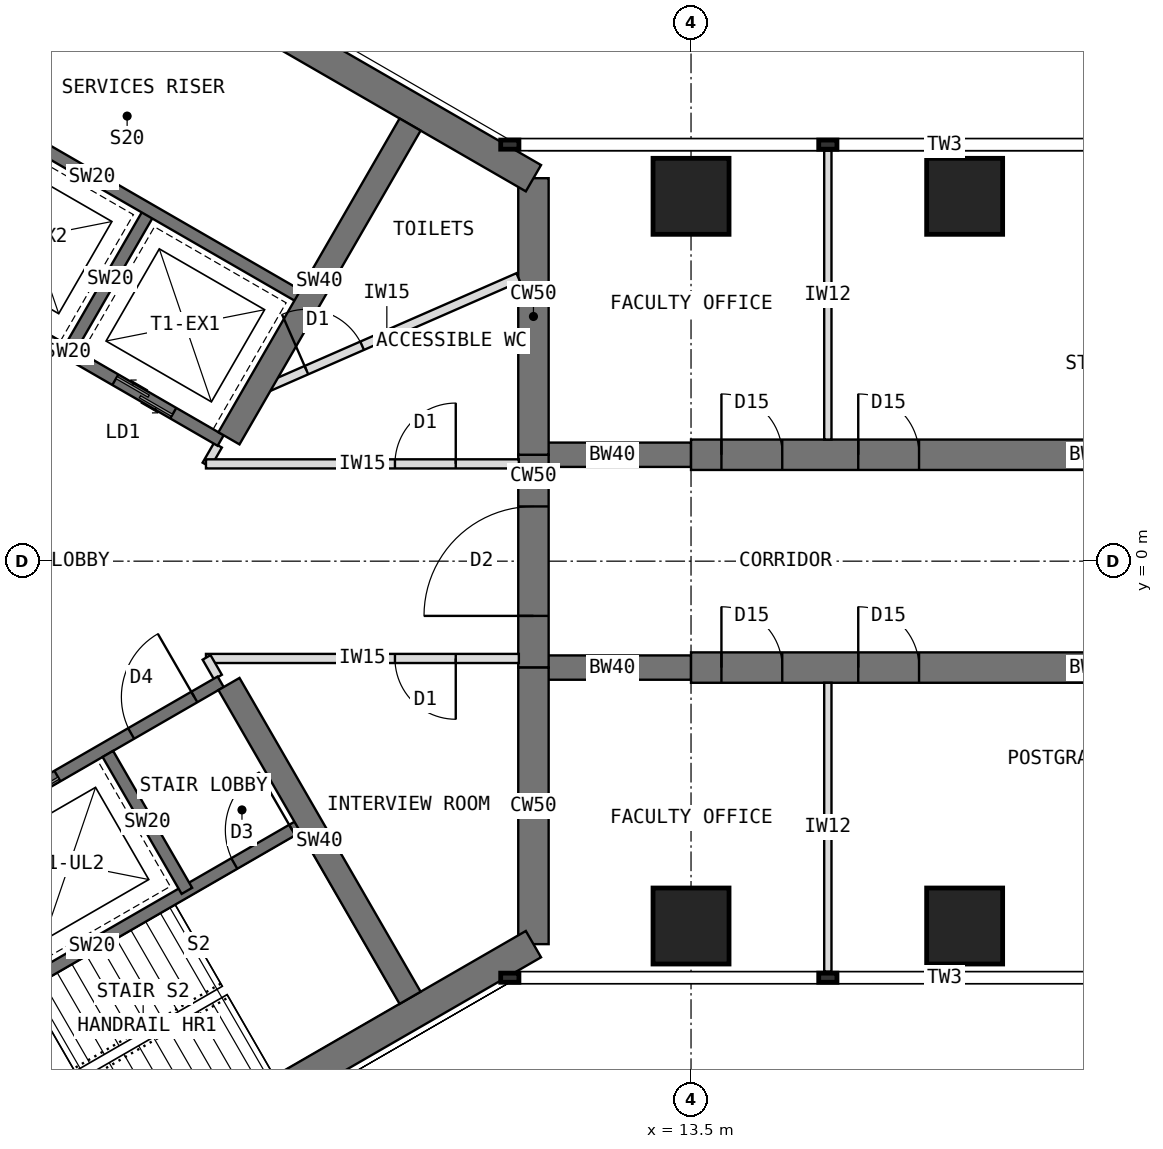
"""IFC4 building model, lengths in metres.
Left out: names, types, materials, properties, quantities, classifications, styles, units other than length and angle.
Written with IfcOpenShell. Run it as: python <this file> out.ifc"""

import sys

from ifc_helpers import new_model, si_unit, direction, frame, frame_2d, origin, origin_2d, place, context, subcontext, project, spatial, rectangle, extrude, element, fill, save


model = new_model("IFC4")
c1 = context("Model", 3, precision=1e-05, world=origin(), true_north=direction((0.0, 1.0)))
c2 = subcontext(c1, "Body", "Model", "MODEL_VIEW")
j1 = project(units=[si_unit("LENGTHUNIT", "METRE"), si_unit("PLANEANGLEUNIT", "RADIAN")], contexts=[c1])
p1 = place(None, origin())
s1 = spatial("IfcSite", under=j1, at=p1, CompositionType="ELEMENT")
p2 = place(p1, origin())
s2 = spatial("IfcBuilding", under=s1, at=p2, CompositionType="ELEMENT")
p3 = place(p2, frame((0.0, 0.0, 170.5)))
s3 = spatial("IfcBuildingStorey", under=s2, at=p3, CompositionType="ELEMENT", Elevation=170.5)
p4 = place(p3, frame((10.908, -6.298, 0.0), z_axis=(0.0, 0.0, 1.0), x_axis=(0.0, 1.0, 0.0)))
e1 = element("IfcWall", 1, at=p4, inside=s3, PredefinedType="SHEAR", context=c2, shape_type="SweptSolid", body=[
    extrude(rectangle(XDim=4.548, YDim=0.5, at=frame_2d((2.274, 0.0))), origin(), (0.0, 0.0, 1.0), 4.0),
])
p5 = place(p3, frame((10.908, -1.75, 0.0), z_axis=(0.0, 0.0, 1.0), x_axis=(0.0, 1.0, 0.0)))
e2 = element("IfcWall", 2, at=p5, inside=s3, PredefinedType="SHEAR", context=c2, shape_type="SweptSolid", body=[
    extrude(rectangle(XDim=3.5, YDim=0.5, at=frame_2d((1.75, 0.0))), origin(), (0.0, 0.0, 1.0), 4.0),
])
p6 = place(p5, frame((0.85, 0.0, 0.0)))
e3 = element("IfcOpeningElement", 3, at=p6, cuts=e2, PredefinedType="OPENING", context=c2, shape_type="SweptSolid", body=[
    extrude(rectangle(XDim=1.8, YDim=2.1, at=frame_2d((0.9, 1.05))), frame((0.0, 0.26, 0.0), z_axis=(0.0, -1.0, 0.0), x_axis=(1.0, 0.0, 0.0)), (0.0, 0.0, 1.0), 0.52),
])
p7 = place(p3, frame((10.908, 1.75, 0.0), z_axis=(0.0, 0.0, 1.0), x_axis=(0.0, 1.0, 0.0)))
e4 = element("IfcWall", 4, at=p7, inside=s3, PredefinedType="SHEAR", context=c2, shape_type="SweptSolid", body=[
    extrude(rectangle(XDim=4.548, YDim=0.5, at=frame_2d((2.274, 0.0))), origin(), (0.0, 0.0, 1.0), 4.0),
])
for number, where, z_axis, x_axis in (
    (5, (10.908, 6.298, 0.0), (0.0, 0.0, 1.0), (-0.866, 0.5, 0.0)),
    (6, (0.0, -12.596, 0.0), (0.0, 0.0, 1.0), (0.866, 0.5, 0.0)),
):
    element("IfcWall", number, at=place(p3, frame(where, z_axis=z_axis, x_axis=x_axis)), inside=s3, PredefinedType="SHEAR", context=c2, shape_type="SweptSolid", body=[
        extrude(rectangle(XDim=12.596, YDim=0.5, at=frame_2d((6.298, 0.0))), origin(), (0.0, 0.0, 1.0), 4.0),
    ])
p8 = place(p3, frame((10.908, 1.75, 0.0), z_axis=(0.0, 0.0, 1.0), x_axis=(1.0, 0.0, 0.0)))
e7 = element("IfcWall", 7, at=p8, inside=s3, PredefinedType="SHEAR", context=c2, shape_type="SweptSolid", body=[
    extrude(rectangle(XDim=2.592, YDim=0.4, at=frame_2d((1.296, 0.0))), origin(), (0.0, 0.0, 1.0), 4.0),
])
p9 = place(p3, frame((13.5, 1.75, 0.0), z_axis=(0.0, 0.0, 1.0), x_axis=(1.0, 0.0, 0.0)))
e8 = element("IfcWall", 8, at=p9, inside=s3, PredefinedType="SHEAR", context=c2, shape_type="SweptSolid", body=[
    extrude(rectangle(XDim=13.2, YDim=0.5, at=frame_2d((6.6, 0.0))), origin(), (0.0, 0.0, 1.0), 4.0),
])
p10 = place(p9, frame((0.5, 0.0, 0.0)))
e9 = element("IfcOpeningElement", 9, at=p10, cuts=e8, PredefinedType="OPENING", context=c2, shape_type="SweptSolid", body=[
    extrude(rectangle(XDim=1.0, YDim=2.1, at=frame_2d((0.5, 1.05))), frame((0.0, 0.26, 0.0), z_axis=(0.0, -1.0, 0.0), x_axis=(1.0, 0.0, 0.0)), (0.0, 0.0, 1.0), 0.52),
])
p11 = place(p9, frame((2.75, 0.0, 0.0)))
e10 = element("IfcOpeningElement", 10, at=p11, cuts=e8, PredefinedType="OPENING", context=c2, shape_type="SweptSolid", body=[
    extrude(rectangle(XDim=1.0, YDim=2.1, at=frame_2d((0.5, 1.05))), frame((0.0, 0.26, 0.0), z_axis=(0.0, -1.0, 0.0), x_axis=(1.0, 0.0, 0.0)), (0.0, 0.0, 1.0), 0.52),
])
p12 = place(p3, frame((10.908, -1.75, 0.0), z_axis=(0.0, 0.0, 1.0), x_axis=(1.0, 0.0, 0.0)))
e11 = element("IfcWall", 11, at=p12, inside=s3, PredefinedType="SHEAR", context=c2, shape_type="SweptSolid", body=[
    extrude(rectangle(XDim=2.592, YDim=0.4, at=frame_2d((1.296, 0.0))), origin(), (0.0, 0.0, 1.0), 4.0),
])
p13 = place(p3, frame((13.5, -1.75, 0.0), z_axis=(0.0, 0.0, 1.0), x_axis=(1.0, 0.0, 0.0)))
e12 = element("IfcWall", 12, at=p13, inside=s3, PredefinedType="SHEAR", context=c2, shape_type="SweptSolid", body=[
    extrude(rectangle(XDim=13.2, YDim=0.5, at=frame_2d((6.6, 0.0))), origin(), (0.0, 0.0, 1.0), 4.0),
])
p14 = place(p13, frame((0.5, 0.0, 0.0)))
e13 = element("IfcOpeningElement", 13, at=p14, cuts=e12, PredefinedType="OPENING", context=c2, shape_type="SweptSolid", body=[
    extrude(rectangle(XDim=1.0, YDim=2.1, at=frame_2d((0.5, 1.05))), frame((0.0, 0.26, 0.0), z_axis=(0.0, -1.0, 0.0), x_axis=(1.0, 0.0, 0.0)), (0.0, 0.0, 1.0), 0.52),
])
p15 = place(p13, frame((2.75, 0.0, 0.0)))
e14 = element("IfcOpeningElement", 14, at=p15, cuts=e12, PredefinedType="OPENING", context=c2, shape_type="SweptSolid", body=[
    extrude(rectangle(XDim=1.0, YDim=2.1, at=frame_2d((0.5, 1.05))), frame((0.0, 0.26, 0.0), z_axis=(0.0, -1.0, 0.0), x_axis=(1.0, 0.0, 0.0)), (0.0, 0.0, 1.0), 0.52),
])
for number, where, z_axis, x_axis in (
    (15, (13.5, 6.0, 0.0), (0.0, 0.0, 1.0), (1.0, 0.0, 0.0)),
    (16, (13.5, -6.0, 0.0), (0.0, 0.0, 1.0), (1.0, 0.0, 0.0)),
    (17, (18.0, 6.0, 0.0), (0.0, 0.0, 1.0), (1.0, 0.0, 0.0)),
    (18, (18.0, -6.0, 0.0), (0.0, 0.0, 1.0), (1.0, 0.0, 0.0)),
):
    element("IfcColumn", number, at=place(p3, frame(where, z_axis=z_axis, x_axis=x_axis)), inside=s3, PredefinedType="COLUMN", context=c2, shape_type="SweptSolid", body=[
        extrude(rectangle(XDim=1.25, YDim=1.25, at=origin_2d()), origin(), (0.0, 0.0, 1.0), 4.0),
    ])
p16 = place(p3, frame((5.764, 1.984, 0.0), z_axis=(0.0, 0.0, 1.0), x_axis=(-0.866026010844, 0.49999894854, 0.0)))
e19 = element("IfcWall", 19, at=p16, inside=s3, PredefinedType="SHEAR", context=c2, shape_type="SweptSolid", body=[
    extrude(rectangle(XDim=8.0, YDim=0.2, at=frame_2d((4.0, 0.0))), origin(), (0.0, 0.0, 1.0), 4.0),
])
p17 = place(p16, frame((6.3, 0.0, 0.0)))
e20 = element("IfcOpeningElement", 20, at=p17, cuts=e19, PredefinedType="OPENING", context=c2, shape_type="SweptSolid", body=[
    extrude(rectangle(XDim=1.2, YDim=2.1, at=frame_2d((0.6, 1.05))), frame((0.0, 0.11, 0.0), z_axis=(0.0, -1.0, 0.0), x_axis=(1.0, 0.0, 0.0)), (0.0, 0.0, 1.0), 0.22),
])
p18 = place(p16, frame((0.9, 0.0, 0.0)))
e21 = element("IfcOpeningElement", 21, at=p18, cuts=e19, PredefinedType="OPENING", context=c2, shape_type="SweptSolid", body=[
    extrude(rectangle(XDim=1.1, YDim=2.2, at=frame_2d((0.55, 1.1))), frame((0.0, 0.11, 0.0), z_axis=(0.0, -1.0, 0.0), x_axis=(1.0, 0.0, 0.0)), (0.0, 0.0, 1.0), 0.22),
])
p19 = place(p16, frame((3.8, 0.0, 0.0)))
e22 = element("IfcOpeningElement", 22, at=p19, cuts=e19, PredefinedType="OPENING", context=c2, shape_type="SweptSolid", body=[
    extrude(rectangle(XDim=1.1, YDim=2.2, at=frame_2d((0.55, 1.1))), frame((0.0, 0.11, 0.0), z_axis=(0.0, -1.0, 0.0), x_axis=(1.0, 0.0, 0.0)), (0.0, 0.0, 1.0), 0.22),
])
p20 = place(p3, frame((3.303, 3.52, 0.0), z_axis=(0.0, 0.0, 1.0), x_axis=(0.499936506574, 0.866062058628, 0.0)))
e23 = element("IfcWall", 23, at=p20, inside=s3, PredefinedType="SHEAR", context=c2, shape_type="SweptSolid", body=[
    extrude(rectangle(XDim=2.6, YDim=0.2, at=frame_2d((1.3, 0.0))), origin(), (0.0, 0.0, 1.0), 4.0),
])
p21 = place(p3, frame((7.114, 4.322, 0.0), z_axis=(0.0, 0.0, 1.0), x_axis=(-0.866026010844, 0.49999894854, 0.0)))
e24 = element("IfcWall", 24, at=p21, inside=s3, PredefinedType="SHEAR", context=c2, shape_type="SweptSolid", body=[
    extrude(rectangle(XDim=8.0, YDim=0.2, at=frame_2d((4.0, 0.0))), origin(), (0.0, 0.0, 1.0), 4.0),
])
p22 = place(p21, frame((6.8, 0.0, 0.0)))
e25 = element("IfcOpeningElement", 25, at=p22, cuts=e24, PredefinedType="OPENING", context=c2, shape_type="SweptSolid", body=[
    extrude(rectangle(XDim=0.9, YDim=2.1, at=frame_2d((0.45, 1.05))), frame((0.0, 0.11, 0.0), z_axis=(0.0, -1.0, 0.0), x_axis=(1.0, 0.0, 0.0)), (0.0, 0.0, 1.0), 0.22),
])
p23 = place(p3, frame((5.901, 2.02, 0.0), z_axis=(0.0, 0.0, 1.0), x_axis=(0.500003832394, 0.86602319114, 0.0)))
e26 = element("IfcWall", 26, at=p23, inside=s3, PredefinedType="SHEAR", context=c2, shape_type="SweptSolid", body=[
    extrude(rectangle(XDim=5.958, YDim=0.4, at=frame_2d((2.979, 0.0))), origin(), (0.0, 0.0, 1.0), 4.0),
])
p24 = place(p3, frame((-1.164, -5.984, 0.0), z_axis=(0.0, 0.0, 1.0), x_axis=(0.866026010844, 0.49999894854, 0.0)))
e27 = element("IfcWall", 27, at=p24, inside=s3, PredefinedType="SHEAR", context=c2, shape_type="SweptSolid", body=[
    extrude(rectangle(XDim=8.0, YDim=0.2, at=frame_2d((4.0, 0.0))), origin(), (0.0, 0.0, 1.0), 4.0),
])
p25 = place(p24, frame((6.3, 0.0, 0.0)))
e28 = element("IfcOpeningElement", 28, at=p25, cuts=e27, PredefinedType="OPENING", context=c2, shape_type="SweptSolid", body=[
    extrude(rectangle(XDim=1.2, YDim=2.1, at=frame_2d((0.6, 1.05))), frame((0.0, 0.11, 0.0), z_axis=(0.0, -1.0, 0.0), x_axis=(1.0, 0.0, 0.0)), (0.0, 0.0, 1.0), 0.22),
])
p26 = place(p24, frame((0.9, 0.0, 0.0)))
e29 = element("IfcOpeningElement", 29, at=p26, cuts=e27, PredefinedType="OPENING", context=c2, shape_type="SweptSolid", body=[
    extrude(rectangle(XDim=1.1, YDim=2.2, at=frame_2d((0.55, 1.1))), frame((0.0, 0.11, 0.0), z_axis=(0.0, -1.0, 0.0), x_axis=(1.0, 0.0, 0.0)), (0.0, 0.0, 1.0), 0.22),
])
p27 = place(p24, frame((3.8, 0.0, 0.0)))
e30 = element("IfcOpeningElement", 30, at=p27, cuts=e27, PredefinedType="OPENING", context=c2, shape_type="SweptSolid", body=[
    extrude(rectangle(XDim=1.1, YDim=2.2, at=frame_2d((0.55, 1.1))), frame((0.0, 0.11, 0.0), z_axis=(0.0, -1.0, 0.0), x_axis=(1.0, 0.0, 0.0)), (0.0, 0.0, 1.0), 0.22),
])
p28 = place(p3, frame((3.909, -3.17, 0.0), z_axis=(0.0, 0.0, 1.0), x_axis=(0.49997716683, -0.86603858612, 0.0)))
e31 = element("IfcWall", 31, at=p28, inside=s3, PredefinedType="SHEAR", context=c2, shape_type="SweptSolid", body=[
    extrude(rectangle(XDim=2.6, YDim=0.2, at=frame_2d((1.3, 0.0))), origin(), (0.0, 0.0, 1.0), 4.0),
])
p29 = place(p3, frame((0.186, -8.322, 0.0), z_axis=(0.0, 0.0, 1.0), x_axis=(0.866026010844, 0.49999894854, 0.0)))
e32 = element("IfcWall", 32, at=p29, inside=s3, PredefinedType="SHEAR", context=c2, shape_type="SweptSolid", body=[
    extrude(rectangle(XDim=8.0, YDim=0.2, at=frame_2d((4.0, 0.0))), origin(), (0.0, 0.0, 1.0), 4.0),
])
p30 = place(p29, frame((6.7, 0.0, 0.0)))
e33 = element("IfcOpeningElement", 33, at=p30, cuts=e32, PredefinedType="OPENING", context=c2, shape_type="SweptSolid", body=[
    extrude(rectangle(XDim=1.1, YDim=2.1, at=frame_2d((0.55, 1.05))), frame((0.0, 0.11, 0.0), z_axis=(0.0, -1.0, 0.0), x_axis=(1.0, 0.0, 0.0)), (0.0, 0.0, 1.0), 0.22),
])
p31 = place(p3, frame((5.901, -2.02, 0.0), z_axis=(0.0, 0.0, 1.0), x_axis=(0.500003832394, -0.86602319114, 0.0)))
e34 = element("IfcWall", 34, at=p31, inside=s3, PredefinedType="SHEAR", context=c2, shape_type="SweptSolid", body=[
    extrude(rectangle(XDim=5.958, YDim=0.4, at=frame_2d((2.979, 0.0))), origin(), (0.0, 0.0, 1.0), 4.0),
])
for number, where, z_axis, x_axis in (
    (35, (15.75, 2.0, 0.0), (0.0, 0.0, 1.0), (0.0, 1.0, 0.0)),
    (36, (15.75, -2.0, 0.0), (0.0, 0.0, 1.0), (0.0, -1.0, 0.0)),
):
    element("IfcWall", number, at=place(p3, frame(where, z_axis=z_axis, x_axis=x_axis)), inside=s3, PredefinedType="PARTITIONING", context=c2, shape_type="SweptSolid", body=[
        extrude(rectangle(XDim=4.75, YDim=0.12, at=frame_2d((2.375, 0.0))), origin(), (0.0, 0.0, 1.0), 3.8),
    ])
p32 = place(p3, frame((5.719, 1.906, 0.0), z_axis=(0.0, 0.0, 1.0), x_axis=(-0.499590185398, -0.866261881104, 0.0)))
e37 = element("IfcWall", 37, at=p32, inside=s3, PredefinedType="PARTITIONING", context=c2, shape_type="SweptSolid", body=[
    extrude(rectangle(XDim=0.373, YDim=0.15, at=frame_2d((0.187, 0.0))), origin(), (0.0, 0.0, 1.0), 3.8),
])
p33 = place(p3, frame((5.523, 1.6, 0.0), z_axis=(0.0, 0.0, 1.0), x_axis=(1.0, 0.0, 0.0)))
e38 = element("IfcWall", 38, at=p33, inside=s3, PredefinedType="PARTITIONING", context=c2, shape_type="SweptSolid", body=[
    extrude(rectangle(XDim=5.146, YDim=0.15, at=frame_2d((2.573, 0.0))), origin(), (0.0, 0.0, 1.0), 3.8),
])
p34 = place(p33, frame((3.108, 0.0, 0.0)))
e39 = element("IfcOpeningElement", 39, at=p34, cuts=e38, PredefinedType="OPENING", context=c2, shape_type="SweptSolid", body=[
    extrude(rectangle(XDim=1.0, YDim=2.1, at=frame_2d((0.5, 1.05))), frame((0.0, 0.085, 0.0), z_axis=(0.0, -1.0, 0.0), x_axis=(1.0, 0.0, 0.0)), (0.0, 0.0, 1.0), 0.17),
])
p35 = place(p3, frame((10.668, -1.6, 0.0), z_axis=(0.0, 0.0, 1.0), x_axis=(-1.0, 0.0, 0.0)))
e40 = element("IfcWall", 40, at=p35, inside=s3, PredefinedType="PARTITIONING", context=c2, shape_type="SweptSolid", body=[
    extrude(rectangle(XDim=5.146, YDim=0.15, at=frame_2d((2.573, 0.0))), origin(), (0.0, 0.0, 1.0), 3.8),
])
p36 = place(p35, frame((1.038, 0.0, 0.0)))
e41 = element("IfcOpeningElement", 41, at=p36, cuts=e40, PredefinedType="OPENING", context=c2, shape_type="SweptSolid", body=[
    extrude(rectangle(XDim=1.0, YDim=2.1, at=frame_2d((0.5, 1.05))), frame((0.0, 0.085, 0.0), z_axis=(0.0, -1.0, 0.0), x_axis=(1.0, 0.0, 0.0)), (0.0, 0.0, 1.0), 0.17),
])
p37 = place(p3, frame((5.533, -1.583, 0.0), z_axis=(0.0, 0.0, 1.0), x_axis=(0.499590185398, -0.866261881104, 0.0)))
e42 = element("IfcWall", 42, at=p37, inside=s3, PredefinedType="PARTITIONING", context=c2, shape_type="SweptSolid", body=[
    extrude(rectangle(XDim=0.373, YDim=0.15, at=frame_2d((0.187, 0.0))), origin(), (0.0, 0.0, 1.0), 3.8),
])
p38 = place(p3, frame((6.336, 2.774, 0.0), z_axis=(0.0, 0.0, 1.0), x_axis=(0.916033790083, 0.401101103746, 0.0)))
e43 = element("IfcWall", 43, at=p38, inside=s3, PredefinedType="PARTITIONING", context=c2, shape_type="SweptSolid", body=[
    extrude(rectangle(XDim=4.719, YDim=0.15, at=frame_2d((2.359, 0.0))), origin(), (0.0, 0.0, 1.0), 3.8),
])
p39 = place(p38, frame((0.916, 0.0, 0.0)))
e44 = element("IfcOpeningElement", 44, at=p39, cuts=e43, PredefinedType="OPENING", context=c2, shape_type="SweptSolid", body=[
    extrude(rectangle(XDim=1.0, YDim=2.1, at=frame_2d((0.5, 1.05))), frame((0.0, 0.085, 0.0), z_axis=(0.0, -1.0, 0.0), x_axis=(1.0, 0.0, 0.0)), (0.0, 0.0, 1.0), 0.17),
])
p40 = place(p18, origin())
e45 = element("IfcDoor", 45, at=p40, inside=s3, OperationType="DOUBLE_DOOR_SLIDING", PredefinedType="DOOR", context=c2, shape_type="SweptSolid", body=[
    extrude(rectangle(XDim=1.1, YDim=2.2, at=frame_2d((0.55, 1.1))), frame((0.0, 0.025, 0.0), z_axis=(0.0, -1.0, 0.0), x_axis=(1.0, 0.0, 0.0)), (0.0, 0.0, 1.0), 0.05),
])
fill(e21, e45)
p41 = place(p25, origin())
e46 = element("IfcDoor", 46, at=p41, inside=s3, OperationType="SINGLE_SWING_RIGHT", PredefinedType="DOOR", context=c2, shape_type="SweptSolid", body=[
    extrude(rectangle(XDim=1.2, YDim=2.1, at=frame_2d((0.6, 1.05))), frame((0.0, 0.025, 0.0), z_axis=(0.0, -1.0, 0.0), x_axis=(1.0, 0.0, 0.0)), (0.0, 0.0, 1.0), 0.05),
])
fill(e28, e46)
p42 = place(p27, origin())
e47 = element("IfcDoor", 47, at=p42, inside=s3, OperationType="DOUBLE_DOOR_SLIDING", PredefinedType="DOOR", context=c2, shape_type="SweptSolid", body=[
    extrude(rectangle(XDim=1.1, YDim=2.2, at=frame_2d((0.55, 1.1))), frame((0.0, 0.025, 0.0), z_axis=(0.0, -1.0, 0.0), x_axis=(1.0, 0.0, 0.0)), (0.0, 0.0, 1.0), 0.05),
])
fill(e30, e47)
p43 = place(p30, origin())
e48 = element("IfcDoor", 48, at=p43, inside=s3, OperationType="SINGLE_SWING_RIGHT", PredefinedType="DOOR", context=c2, shape_type="SweptSolid", body=[
    extrude(rectangle(XDim=1.1, YDim=2.1, at=frame_2d((0.55, 1.05))), frame((0.0, 0.025, 0.0), z_axis=(0.0, -1.0, 0.0), x_axis=(1.0, 0.0, 0.0)), (0.0, 0.0, 1.0), 0.05),
])
fill(e33, e48)
p44 = place(p6, origin())
e49 = element("IfcDoor", 49, at=p44, inside=s3, OperationType="DOUBLE_DOOR_DOUBLE_SWING", PredefinedType="DOOR", context=c2, shape_type="SweptSolid", body=[
    extrude(rectangle(XDim=1.8, YDim=2.1, at=frame_2d((0.9, 1.05))), frame((0.0, 0.025, 0.0), z_axis=(0.0, -1.0, 0.0), x_axis=(1.0, 0.0, 0.0)), (0.0, 0.0, 1.0), 0.05),
])
fill(e3, e49)
p45 = place(p36, origin())
e50 = element("IfcDoor", 50, at=p45, inside=s3, OperationType="SINGLE_SWING_LEFT", PredefinedType="DOOR", context=c2, shape_type="SweptSolid", body=[
    extrude(rectangle(XDim=1.0, YDim=2.1, at=frame_2d((0.5, 1.05))), frame((0.0, 0.025, 0.0), z_axis=(0.0, -1.0, 0.0), x_axis=(1.0, 0.0, 0.0)), (0.0, 0.0, 1.0), 0.05),
])
fill(e41, e50)
p46 = place(p34, origin())
e51 = element("IfcDoor", 51, at=p46, inside=s3, OperationType="SINGLE_SWING_RIGHT", PredefinedType="DOOR", context=c2, shape_type="SweptSolid", body=[
    extrude(rectangle(XDim=1.0, YDim=2.1, at=frame_2d((0.5, 1.05))), frame((0.0, 0.025, 0.0), z_axis=(0.0, -1.0, 0.0), x_axis=(1.0, 0.0, 0.0)), (0.0, 0.0, 1.0), 0.05),
])
fill(e39, e51)
p47 = place(p39, origin())
e52 = element("IfcDoor", 52, at=p47, inside=s3, OperationType="SINGLE_SWING_LEFT", PredefinedType="DOOR", context=c2, shape_type="SweptSolid", body=[
    extrude(rectangle(XDim=1.0, YDim=2.1, at=frame_2d((0.5, 1.05))), frame((0.0, 0.025, 0.0), z_axis=(0.0, -1.0, 0.0), x_axis=(1.0, 0.0, 0.0)), (0.0, 0.0, 1.0), 0.05),
])
fill(e44, e52)
p48 = place(p10, origin())
e53 = element("IfcDoor", 53, at=p48, inside=s3, OperationType="SINGLE_SWING_LEFT", PredefinedType="DOOR", context=c2, shape_type="SweptSolid", body=[
    extrude(rectangle(XDim=1.0, YDim=2.1, at=frame_2d((0.5, 1.05))), frame((0.0, 0.025, 0.0), z_axis=(0.0, -1.0, 0.0), x_axis=(1.0, 0.0, 0.0)), (0.0, 0.0, 1.0), 0.05),
])
fill(e9, e53)
p49 = place(p11, origin())
e54 = element("IfcDoor", 54, at=p49, inside=s3, OperationType="SINGLE_SWING_LEFT", PredefinedType="DOOR", context=c2, shape_type="SweptSolid", body=[
    extrude(rectangle(XDim=1.0, YDim=2.1, at=frame_2d((0.5, 1.05))), frame((0.0, 0.025, 0.0), z_axis=(0.0, -1.0, 0.0), x_axis=(1.0, 0.0, 0.0)), (0.0, 0.0, 1.0), 0.05),
])
fill(e10, e54)
p50 = place(p14, origin())
e55 = element("IfcDoor", 55, at=p50, inside=s3, OperationType="SINGLE_SWING_LEFT", PredefinedType="DOOR", context=c2, shape_type="SweptSolid", body=[
    extrude(rectangle(XDim=1.0, YDim=2.1, at=frame_2d((0.5, 1.05))), frame((0.0, 0.025, 0.0), z_axis=(0.0, -1.0, 0.0), x_axis=(1.0, 0.0, 0.0)), (0.0, 0.0, 1.0), 0.05),
])
fill(e13, e55)
p51 = place(p15, origin())
e56 = element("IfcDoor", 56, at=p51, inside=s3, OperationType="SINGLE_SWING_LEFT", PredefinedType="DOOR", context=c2, shape_type="SweptSolid", body=[
    extrude(rectangle(XDim=1.0, YDim=2.1, at=frame_2d((0.5, 1.05))), frame((0.0, 0.025, 0.0), z_axis=(0.0, -1.0, 0.0), x_axis=(1.0, 0.0, 0.0)), (0.0, 0.0, 1.0), 0.05),
])
fill(e14, e56)
save(model, sys.argv[1])
